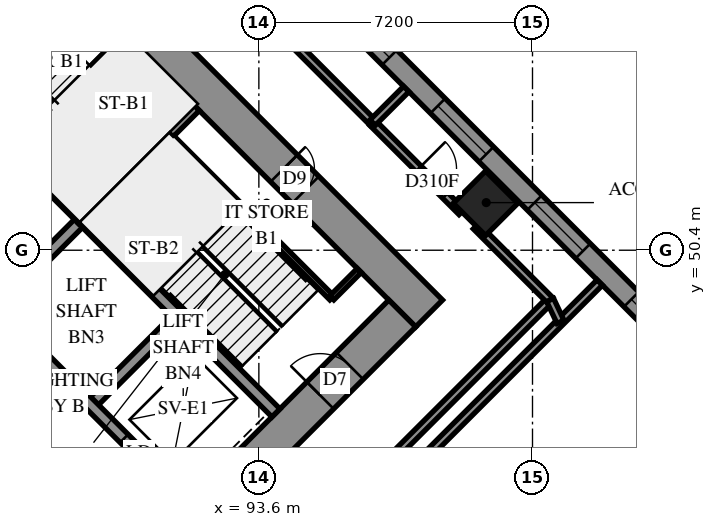
"""IFC4 building model, lengths in metres.
Left out: names, types, materials, properties, quantities, classifications, styles, units other than length and angle.
Written with IfcOpenShell. Run it as: python <this file> out.ifc"""

import sys

from ifc_helpers import new_model, si_unit, direction, frame, frame_2d, origin, origin_2d, place, context, subcontext, project, spatial, polyline, rectangle, outline, extrude, element, fill, save


model = new_model("IFC4")
c1 = context("Model", 3, precision=1e-05, world=origin(), true_north=direction((0.0, 1.0)))
c2 = subcontext(c1, "Body", "Model", "MODEL_VIEW")
j1 = project(units=[si_unit("LENGTHUNIT", "METRE"), si_unit("PLANEANGLEUNIT", "RADIAN")], contexts=[c1])
p1 = place(None, origin())
s1 = spatial("IfcSite", under=j1, at=p1, CompositionType="ELEMENT")
p2 = place(p1, origin())
s2 = spatial("IfcBuilding", under=s1, at=p2, CompositionType="ELEMENT")
p3 = place(p2, frame((0.0, 0.0, 22.8)))
s3 = spatial("IfcBuildingStorey", under=s2, at=p3, CompositionType="ELEMENT", Elevation=22.8)
p4 = place(p3, frame((99.565, 51.635, 0.0), z_axis=(0.0, 0.0, 1.0), x_axis=(0.7071067812, -0.7071067812, 0.0)))
e1 = element("IfcColumn", 1, at=p4, inside=s3, PredefinedType="COLUMN", context=c2, shape_type="SweptSolid", body=[
    extrude(rectangle(XDim=1.2, YDim=1.2, at=origin_2d()), origin(), (0.0, 0.0, 1.0), 3.9),
])
p5 = place(p3, frame((86.483, 60.333, -0.4), z_axis=(0.0, 0.0, 1.0), x_axis=(0.70710983, -0.7071037324, 0.0)))
e2 = element("IfcWall", 2, at=p5, inside=s3, PredefinedType="SHEAR", context=c2, shape_type="SweptSolid", body=[
    extrude(rectangle(XDim=16.4, YDim=1.0, at=frame_2d((8.2, 0.0))), origin(), (0.0, 0.0, 1.0), 3.6),
])
p6 = place(p5, frame((11.0, 0.0, 0.4)))
e3 = element("IfcOpeningElement", 3, at=p6, cuts=e2, PredefinedType="OPENING", context=c2, shape_type="SweptSolid", body=[
    extrude(rectangle(XDim=0.8, YDim=2.1, at=frame_2d((0.4, 1.05))), frame((0.0, 0.51, 0.0), z_axis=(0.0, -1.0, 0.0), x_axis=(1.0, 0.0, 0.0)), (0.0, 0.0, 1.0), 1.02),
])
p7 = place(p3, frame((87.19, 38.554, -0.4), z_axis=(0.0, 0.0, 1.0), x_axis=(0.707103309, 0.7071102534, 0.0)))
e4 = element("IfcWall", 4, at=p7, inside=s3, PredefinedType="SHEAR", context=c2, shape_type="SweptSolid", body=[
    extrude(rectangle(XDim=14.4, YDim=1.0, at=frame_2d((7.2, 0.0))), origin(), (0.0, 0.0, 1.0), 3.6),
])
p8 = place(p7, frame((4.55, 0.0, 0.4)))
e5 = element("IfcOpeningElement", 5, at=p8, cuts=e4, PredefinedType="OPENING", context=c2, shape_type="SweptSolid", body=[
    extrude(rectangle(XDim=1.1, YDim=2.1, at=frame_2d((0.55, 1.05))), frame((0.0, 0.51, 0.0), z_axis=(0.0, -1.0, 0.0), x_axis=(1.0, 0.0, 0.0)), (0.0, 0.0, 1.0), 1.02),
])
p9 = place(p7, frame((11.35, 0.0, 0.4)))
e6 = element("IfcOpeningElement", 6, at=p9, cuts=e4, PredefinedType="OPENING", context=c2, shape_type="SweptSolid", body=[
    extrude(rectangle(XDim=1.1, YDim=2.1, at=frame_2d((0.55, 1.05))), frame((0.0, 0.51, 0.0), z_axis=(0.0, -1.0, 0.0), x_axis=(1.0, 0.0, 0.0)), (0.0, 0.0, 1.0), 1.02),
])
for number, where, z_axis, x_axis in (
    (7, (86.625, 48.878, 0.0), (0.0, 0.0, 1.0), (0.707, 0.707, 0.0)),
    (8, (89.17, 46.332, 0.0), (0.0, 0.0, 1.0), (0.707, 0.707, 0.0)),
):
    element("IfcWall", number, at=place(p3, frame(where, z_axis=z_axis, x_axis=x_axis)), inside=s3, PredefinedType="SOLIDWALL", context=c2, shape_type="SweptSolid", body=[
        extrude(rectangle(XDim=3.3, YDim=0.3, at=frame_2d((1.65, 0.0))), origin(), (0.0, 0.0, 1.0), 3.9),
    ])
p10 = place(p3, frame((78.988, 51.423, 0.0), z_axis=(0.0, 0.0, 1.0), x_axis=(0.7071067812, -0.7071067812, 0.0)))
e9 = element("IfcWall", 9, at=p10, inside=s3, PredefinedType="SOLIDWALL", context=c2, shape_type="SweptSolid", body=[
    extrude(rectangle(XDim=14.4, YDim=0.3, at=frame_2d((7.2, 0.0))), origin(), (0.0, 0.0, 1.0), 3.9),
])
p11 = place(p10, frame((1.25, 0.0, 0.0)))
e10 = element("IfcOpeningElement", 10, at=p11, cuts=e9, PredefinedType="OPENING", context=c2, shape_type="SweptSolid", body=[
    extrude(rectangle(XDim=1.1, YDim=2.1, at=frame_2d((0.55, 1.05))), frame((0.0, 0.16, 0.0), z_axis=(0.0, -1.0, 0.0), x_axis=(1.0, 0.0, 0.0)), (0.0, 0.0, 1.0), 0.32),
])
p12 = place(p10, frame((4.85, 0.0, 0.0)))
e11 = element("IfcOpeningElement", 11, at=p12, cuts=e9, PredefinedType="OPENING", context=c2, shape_type="SweptSolid", body=[
    extrude(rectangle(XDim=1.1, YDim=2.1, at=frame_2d((0.55, 1.05))), frame((0.0, 0.16, 0.0), z_axis=(0.0, -1.0, 0.0), x_axis=(1.0, 0.0, 0.0)), (0.0, 0.0, 1.0), 0.32),
])
p13 = place(p10, frame((8.45, 0.0, 0.0)))
e12 = element("IfcOpeningElement", 12, at=p13, cuts=e9, PredefinedType="OPENING", context=c2, shape_type="SweptSolid", body=[
    extrude(rectangle(XDim=1.1, YDim=2.1, at=frame_2d((0.55, 1.05))), frame((0.0, 0.16, 0.0), z_axis=(0.0, -1.0, 0.0), x_axis=(1.0, 0.0, 0.0)), (0.0, 0.0, 1.0), 0.32),
])
p14 = place(p10, frame((12.05, 0.0, 0.0)))
e13 = element("IfcOpeningElement", 13, at=p14, cuts=e9, PredefinedType="OPENING", context=c2, shape_type="SweptSolid", body=[
    extrude(rectangle(XDim=1.1, YDim=2.1, at=frame_2d((0.55, 1.05))), frame((0.0, 0.16, 0.0), z_axis=(0.0, -1.0, 0.0), x_axis=(1.0, 0.0, 0.0)), (0.0, 0.0, 1.0), 0.32),
])
p15 = place(p3, frame((81.534, 53.969, 0.0), z_axis=(0.0, 0.0, 1.0), x_axis=(0.707103309, -0.7071102534, 0.0)))
e14 = element("IfcWall", 14, at=p15, inside=s3, PredefinedType="SOLIDWALL", context=c2, shape_type="SweptSolid", body=[
    extrude(rectangle(XDim=14.4, YDim=0.3, at=frame_2d((7.2, 0.0))), origin(), (0.0, 0.0, 1.0), 3.9),
])
p16 = place(p15, frame((12.05, 0.0, 0.0)))
e15 = element("IfcOpeningElement", 15, at=p16, cuts=e14, PredefinedType="OPENING", context=c2, shape_type="SweptSolid", body=[
    extrude(rectangle(XDim=1.1, YDim=2.1, at=frame_2d((0.55, 1.05))), frame((0.0, 0.16, 0.0), z_axis=(0.0, -1.0, 0.0), x_axis=(1.0, 0.0, 0.0)), (0.0, 0.0, 1.0), 0.32),
])
for number, where, z_axis, x_axis in (
    (16, (83.867, 56.302, 0.0), (0.0, 0.0, 1.0), (0.707, -0.707, 0.0)),
    (17, (88.958, 51.211, 0.0), (0.0, 0.0, 1.0), (0.707, -0.707, 0.0)),
):
    element("IfcWall", number, at=place(p3, frame(where, z_axis=z_axis, x_axis=x_axis)), inside=s3, PredefinedType="SOLIDWALL", context=c2, shape_type="SweptSolid", body=[
        extrude(rectangle(XDim=7.2, YDim=0.3, at=frame_2d((3.6, 0.0))), origin(), (0.0, 0.0, 1.0), 3.9),
    ])
p17 = place(p3, frame((88.958, 51.211, 0.0), z_axis=(0.0, 0.0, 1.0), x_axis=(0.7071067812, 0.7071067812, 0.0)))
e18 = element("IfcWall", 18, at=p17, inside=s3, PredefinedType="SOLIDWALL", context=c2, shape_type="SweptSolid", body=[
    extrude(rectangle(XDim=4.2, YDim=0.3, at=frame_2d((2.1, 0.0))), origin(), (0.0, 0.0, 1.0), 3.9),
])
p18 = place(p3, frame((117.843, 34.665, 0.0), z_axis=(0.0, 0.0, 1.0), x_axis=(-0.7071067812, 0.7071067812, 0.0)))
e19 = element("IfcWall", 19, at=p18, inside=s3, PredefinedType="SOLIDWALL", context=c2, shape_type="SweptSolid", body=[
    extrude(outline(polyline([(-0.275, -0.275), (54.222, -0.275), (53.994, 0.275), (0.275, 0.275), (-0.275, -0.275)])), origin(), (0.0, 0.0, 1.0), 3.9),
])
p19 = place(p18, frame((0.8, 0.0, 0.7)))
e20 = element("IfcOpeningElement", 20, at=p19, cuts=e19, PredefinedType="OPENING", context=c2, shape_type="SweptSolid", body=[
    extrude(rectangle(XDim=1.8, YDim=2.4, at=frame_2d((0.9, 1.2))), frame((0.0, 0.285, 0.0), z_axis=(0.0, -1.0, 0.0), x_axis=(1.0, 0.0, 0.0)), (0.0, 0.0, 1.0), 0.57),
])
p20 = place(p18, frame((4.225, 0.0, 0.7)))
e21 = element("IfcOpeningElement", 21, at=p20, cuts=e19, PredefinedType="OPENING", context=c2, shape_type="SweptSolid", body=[
    extrude(rectangle(XDim=1.8, YDim=2.4, at=frame_2d((0.9, 1.2))), frame((0.0, 0.285, 0.0), z_axis=(0.0, -1.0, 0.0), x_axis=(1.0, 0.0, 0.0)), (0.0, 0.0, 1.0), 0.57),
])
p21 = place(p18, frame((7.825, 0.0, 0.7)))
e22 = element("IfcOpeningElement", 22, at=p21, cuts=e19, PredefinedType="OPENING", context=c2, shape_type="SweptSolid", body=[
    extrude(rectangle(XDim=1.8, YDim=2.4, at=frame_2d((0.9, 1.2))), frame((0.0, 0.285, 0.0), z_axis=(0.0, -1.0, 0.0), x_axis=(1.0, 0.0, 0.0)), (0.0, 0.0, 1.0), 0.57),
])
p22 = place(p18, frame((11.425, 0.0, 0.7)))
e23 = element("IfcOpeningElement", 23, at=p22, cuts=e19, PredefinedType="OPENING", context=c2, shape_type="SweptSolid", body=[
    extrude(rectangle(XDim=1.8, YDim=2.4, at=frame_2d((0.9, 1.2))), frame((0.0, 0.285, 0.0), z_axis=(0.0, -1.0, 0.0), x_axis=(1.0, 0.0, 0.0)), (0.0, 0.0, 1.0), 0.57),
])
p23 = place(p18, frame((15.025, 0.0, 0.7)))
e24 = element("IfcOpeningElement", 24, at=p23, cuts=e19, PredefinedType="OPENING", context=c2, shape_type="SweptSolid", body=[
    extrude(rectangle(XDim=1.8, YDim=2.4, at=frame_2d((0.9, 1.2))), frame((0.0, 0.285, 0.0), z_axis=(0.0, -1.0, 0.0), x_axis=(1.0, 0.0, 0.0)), (0.0, 0.0, 1.0), 0.57),
])
p24 = place(p18, frame((18.625, 0.0, 0.7)))
e25 = element("IfcOpeningElement", 25, at=p24, cuts=e19, PredefinedType="OPENING", context=c2, shape_type="SweptSolid", body=[
    extrude(rectangle(XDim=1.8, YDim=2.4, at=frame_2d((0.9, 1.2))), frame((0.0, 0.285, 0.0), z_axis=(0.0, -1.0, 0.0), x_axis=(1.0, 0.0, 0.0)), (0.0, 0.0, 1.0), 0.57),
])
p25 = place(p18, frame((22.225, 0.0, 0.7)))
e26 = element("IfcOpeningElement", 26, at=p25, cuts=e19, PredefinedType="OPENING", context=c2, shape_type="SweptSolid", body=[
    extrude(rectangle(XDim=1.8, YDim=2.4, at=frame_2d((0.9, 1.2))), frame((0.0, 0.285, 0.0), z_axis=(0.0, -1.0, 0.0), x_axis=(1.0, 0.0, 0.0)), (0.0, 0.0, 1.0), 0.57),
])
p26 = place(p18, frame((25.825, 0.0, 0.7)))
e27 = element("IfcOpeningElement", 27, at=p26, cuts=e19, PredefinedType="OPENING", context=c2, shape_type="SweptSolid", body=[
    extrude(rectangle(XDim=1.8, YDim=2.4, at=frame_2d((0.9, 1.2))), frame((0.0, 0.285, 0.0), z_axis=(0.0, -1.0, 0.0), x_axis=(1.0, 0.0, 0.0)), (0.0, 0.0, 1.0), 0.57),
])
p27 = place(p18, frame((29.425, 0.0, 0.7)))
e28 = element("IfcOpeningElement", 28, at=p27, cuts=e19, PredefinedType="OPENING", context=c2, shape_type="SweptSolid", body=[
    extrude(rectangle(XDim=1.8, YDim=2.4, at=frame_2d((0.9, 1.2))), frame((0.0, 0.285, 0.0), z_axis=(0.0, -1.0, 0.0), x_axis=(1.0, 0.0, 0.0)), (0.0, 0.0, 1.0), 0.57),
])
p28 = place(p18, frame((33.025, 0.0, 0.7)))
e29 = element("IfcOpeningElement", 29, at=p28, cuts=e19, PredefinedType="OPENING", context=c2, shape_type="SweptSolid", body=[
    extrude(rectangle(XDim=1.8, YDim=2.4, at=frame_2d((0.9, 1.2))), frame((0.0, 0.285, 0.0), z_axis=(0.0, -1.0, 0.0), x_axis=(1.0, 0.0, 0.0)), (0.0, 0.0, 1.0), 0.57),
])
p29 = place(p18, frame((36.625, 0.0, 0.7)))
e30 = element("IfcOpeningElement", 30, at=p29, cuts=e19, PredefinedType="OPENING", context=c2, shape_type="SweptSolid", body=[
    extrude(rectangle(XDim=1.8, YDim=2.4, at=frame_2d((0.9, 1.2))), frame((0.0, 0.285, 0.0), z_axis=(0.0, -1.0, 0.0), x_axis=(1.0, 0.0, 0.0)), (0.0, 0.0, 1.0), 0.57),
])
p30 = place(p18, frame((40.225, 0.0, 0.7)))
e31 = element("IfcOpeningElement", 31, at=p30, cuts=e19, PredefinedType="OPENING", context=c2, shape_type="SweptSolid", body=[
    extrude(rectangle(XDim=1.8, YDim=2.4, at=frame_2d((0.9, 1.2))), frame((0.0, 0.285, 0.0), z_axis=(0.0, -1.0, 0.0), x_axis=(1.0, 0.0, 0.0)), (0.0, 0.0, 1.0), 0.57),
])
p31 = place(p18, frame((43.825, 0.0, 0.7)))
e32 = element("IfcOpeningElement", 32, at=p31, cuts=e19, PredefinedType="OPENING", context=c2, shape_type="SweptSolid", body=[
    extrude(rectangle(XDim=1.8, YDim=2.4, at=frame_2d((0.9, 1.2))), frame((0.0, 0.285, 0.0), z_axis=(0.0, -1.0, 0.0), x_axis=(1.0, 0.0, 0.0)), (0.0, 0.0, 1.0), 0.57),
])
p32 = place(p18, frame((47.425, 0.0, 0.7)))
e33 = element("IfcOpeningElement", 33, at=p32, cuts=e19, PredefinedType="OPENING", context=c2, shape_type="SweptSolid", body=[
    extrude(rectangle(XDim=1.8, YDim=2.4, at=frame_2d((0.9, 1.2))), frame((0.0, 0.285, 0.0), z_axis=(0.0, -1.0, 0.0), x_axis=(1.0, 0.0, 0.0)), (0.0, 0.0, 1.0), 0.57),
])
p33 = place(p18, frame((51.06, 0.0, 0.7)))
e34 = element("IfcOpeningElement", 34, at=p33, cuts=e19, PredefinedType="OPENING", context=c2, shape_type="SweptSolid", body=[
    extrude(rectangle(XDim=1.8, YDim=2.4, at=frame_2d((0.9, 1.2))), frame((0.0, 0.285, 0.0), z_axis=(0.0, -1.0, 0.0), x_axis=(1.0, 0.0, 0.0)), (0.0, 0.0, 1.0), 0.57),
])
p34 = place(p3, frame((91.313, 53.354, 0.0), z_axis=(0.0, 0.0, 1.0), x_axis=(0.7071067812, -0.7071067812, 0.0)))
e35 = element("IfcWall", 35, at=p34, inside=s3, PredefinedType="PARTITIONING", context=c2, shape_type="SweptSolid", body=[
    extrude(rectangle(XDim=5.95, YDim=0.15, at=frame_2d((2.975, 0.0))), origin(), (0.0, 0.0, 1.0), 3.9),
])
p35 = place(p3, frame((95.52, 49.146, 0.0), z_axis=(0.0, 0.0, 1.0), x_axis=(0.7071067812, 0.7071067812, 0.0)))
e36 = element("IfcWall", 36, at=p35, inside=s3, PredefinedType="PARTITIONING", context=c2, shape_type="SweptSolid", body=[
    extrude(rectangle(XDim=1.02, YDim=0.15, at=frame_2d((0.51, 0.0))), origin(), (0.0, 0.0, 1.0), 3.9),
])
p36 = place(p3, frame((95.179, 42.161, 0.0), z_axis=(0.0, 0.0, 1.0), x_axis=(0.7071115656, 0.7071019967, 0.0)))
e37 = element("IfcWall", 37, at=p36, inside=s3, PredefinedType="PARTITIONING", context=c2, shape_type="SweptSolid", body=[
    extrude(rectangle(XDim=10.45, YDim=0.2, at=frame_2d((5.225, 0.0))), origin(), (0.0, 0.0, 1.0), 3.9),
])
p37 = place(p3, frame((94.757, 42.587, 0.0), z_axis=(0.0, 0.0, 1.0), x_axis=(0.7071067812, 0.7071067812, 0.0)))
e38 = element("IfcWall", 38, at=p37, inside=s3, PredefinedType="PARTITIONING", context=c2, shape_type="SweptSolid", body=[
    extrude(rectangle(XDim=9.198, YDim=0.2, at=frame_2d((4.599, 0.0))), origin(), (0.0, 0.0, 1.0), 3.9),
])
p38 = place(p3, frame((94.229, 56.129, 0.0), z_axis=(0.0, 0.0, 1.0), x_axis=(0.706808235, -0.7074052014, 0.0)))
e39 = element("IfcWall", 39, at=p38, inside=s3, PredefinedType="PARTITIONING", context=c2, shape_type="SweptSolid", body=[
    extrude(rectangle(XDim=3.35, YDim=0.2, at=frame_2d((1.675, 0.0))), origin(), (0.0, 0.0, 1.0), 3.9),
])
p39 = place(p3, frame((96.591, 53.754, 0.0), z_axis=(0.0, 0.0, 1.0), x_axis=(0.7071067812, -0.7071067812, 0.0)))
e40 = element("IfcWall", 40, at=p39, inside=s3, PredefinedType="PARTITIONING", context=c2, shape_type="SweptSolid", body=[
    extrude(rectangle(XDim=3.318, YDim=0.2, at=frame_2d((1.659, 0.0))), origin(), (0.0, 0.0, 1.0), 3.9),
])
p40 = place(p39, frame((1.71, 0.0, 0.0)))
e41 = element("IfcOpeningElement", 41, at=p40, cuts=e40, PredefinedType="OPENING", context=c2, shape_type="SweptSolid", body=[
    extrude(rectangle(XDim=1.0, YDim=2.1, at=frame_2d((0.5, 1.05))), frame((0.0, 0.11, 0.0), z_axis=(0.0, -1.0, 0.0), x_axis=(1.0, 0.0, 0.0)), (0.0, 0.0, 1.0), 0.22),
])
p41 = place(p3, frame((99.312, 51.032, 0.0), z_axis=(0.0, 0.0, 1.0), x_axis=(0.7071067812, -0.7071067812, 0.0)))
e42 = element("IfcWall", 42, at=p41, inside=s3, PredefinedType="PARTITIONING", context=c2, shape_type="SweptSolid", body=[
    extrude(rectangle(XDim=2.752, YDim=0.2, at=frame_2d((1.376, 0.0))), origin(), (0.0, 0.0, 1.0), 3.9),
])
p42 = place(p3, frame((96.593, 53.757, 0.0), z_axis=(0.0, 0.0, 1.0), x_axis=(0.7070668147, 0.7071467454, 0.0)))
e43 = element("IfcWall", 43, at=p42, inside=s3, PredefinedType="PARTITIONING", context=c2, shape_type="SweptSolid", body=[
    extrude(rectangle(XDim=1.251, YDim=0.2, at=frame_2d((0.626, 0.0))), origin(), (0.0, 0.0, 1.0), 3.9),
])
p43 = place(p3, frame((101.264, 49.091, 0.0), z_axis=(0.0, 0.0, 1.0), x_axis=(0.4270063054, -0.9042486467, 0.0)))
e44 = element("IfcWall", 44, at=p43, inside=s3, PredefinedType="PARTITIONING", context=c2, shape_type="SweptSolid", body=[
    extrude(rectangle(XDim=0.637, YDim=0.2, at=frame_2d((0.319, 0.0))), origin(), (0.0, 0.0, 1.0), 3.9),
])
p44 = place(p24, origin())
e45 = element("IfcWindow", 45, at=p44, inside=s3, PartitioningType="SINGLE_PANEL", PredefinedType="WINDOW", context=c2, shape_type="SweptSolid", body=[
    extrude(rectangle(XDim=1.8, YDim=2.4, at=frame_2d((0.9, 1.2))), frame((0.0, 0.155, 0.0), z_axis=(0.0, -1.0, 0.0), x_axis=(1.0, 0.0, 0.0)), (0.0, 0.0, 1.0), 0.06),
])
fill(e25, e45)
p45 = place(p25, origin())
e46 = element("IfcWindow", 46, at=p45, inside=s3, PartitioningType="SINGLE_PANEL", PredefinedType="WINDOW", context=c2, shape_type="SweptSolid", body=[
    extrude(rectangle(XDim=1.8, YDim=2.4, at=frame_2d((0.9, 1.2))), frame((0.0, 0.155, 0.0), z_axis=(0.0, -1.0, 0.0), x_axis=(1.0, 0.0, 0.0)), (0.0, 0.0, 1.0), 0.06),
])
fill(e26, e46)
p46 = place(p26, origin())
e47 = element("IfcWindow", 47, at=p46, inside=s3, PartitioningType="SINGLE_PANEL", PredefinedType="WINDOW", context=c2, shape_type="SweptSolid", body=[
    extrude(rectangle(XDim=1.8, YDim=2.4, at=frame_2d((0.9, 1.2))), frame((0.0, 0.155, 0.0), z_axis=(0.0, -1.0, 0.0), x_axis=(1.0, 0.0, 0.0)), (0.0, 0.0, 1.0), 0.06),
])
fill(e27, e47)
p47 = place(p27, origin())
e48 = element("IfcWindow", 48, at=p47, inside=s3, PartitioningType="SINGLE_PANEL", PredefinedType="WINDOW", context=c2, shape_type="SweptSolid", body=[
    extrude(rectangle(XDim=1.8, YDim=2.4, at=frame_2d((0.9, 1.2))), frame((0.0, 0.155, 0.0), z_axis=(0.0, -1.0, 0.0), x_axis=(1.0, 0.0, 0.0)), (0.0, 0.0, 1.0), 0.06),
])
fill(e28, e48)
p48 = place(p6, origin())
e49 = element("IfcDoor", 49, at=p48, inside=s3, OperationType="SINGLE_SWING_RIGHT", PredefinedType="DOOR", context=c2, shape_type="SweptSolid", body=[
    extrude(rectangle(XDim=0.8, YDim=2.1, at=frame_2d((0.4, 1.05))), frame((0.0, -0.44, 0.0), z_axis=(0.0, -1.0, 0.0), x_axis=(1.0, 0.0, 0.0)), (0.0, 0.0, 1.0), 0.05),
])
fill(e3, e49)
p49 = place(p9, origin())
e50 = element("IfcDoor", 50, at=p49, inside=s3, OperationType="SINGLE_SWING_RIGHT", PredefinedType="DOOR", context=c2, shape_type="SweptSolid", body=[
    extrude(rectangle(XDim=1.1, YDim=2.1, at=frame_2d((0.55, 1.05))), frame((0.0, 0.025, 0.0), z_axis=(0.0, -1.0, 0.0), x_axis=(1.0, 0.0, 0.0)), (0.0, 0.0, 1.0), 0.05),
])
fill(e6, e50)
p50 = place(p16, origin())
e51 = element("IfcDoor", 51, at=p50, inside=s3, OperationType="SLIDING_TO_RIGHT", PredefinedType="DOOR", context=c2, shape_type="SweptSolid", body=[
    extrude(rectangle(XDim=1.1, YDim=2.1, at=frame_2d((0.55, 1.05))), frame((0.0, 0.025, 0.0), z_axis=(0.0, -1.0, 0.0), x_axis=(1.0, 0.0, 0.0)), (0.0, 0.0, 1.0), 0.05),
])
fill(e15, e51)
p51 = place(p40, origin())
e52 = element("IfcDoor", 52, at=p51, inside=s3, OperationType="SINGLE_SWING_RIGHT", PredefinedType="DOOR", context=c2, shape_type="SweptSolid", body=[
    extrude(rectangle(XDim=1.0, YDim=2.1, at=frame_2d((0.5, 1.05))), frame((0.0, 0.025, 0.0), z_axis=(0.0, -1.0, 0.0), x_axis=(1.0, 0.0, 0.0)), (0.0, 0.0, 1.0), 0.05),
])
fill(e41, e52)
save(model, sys.argv[1])
